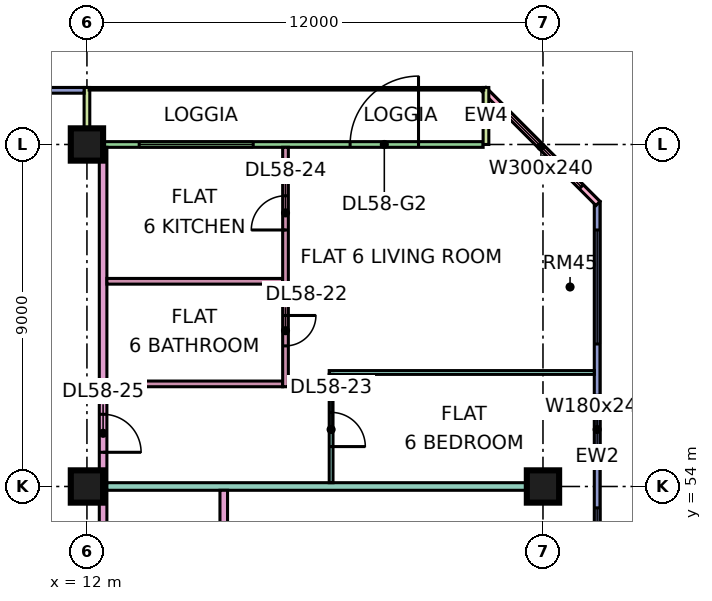
"""IFC4 building model, lengths in metres.
Left out: names, types, materials, properties, quantities, classifications, styles, units other than length and angle.
Written with IfcOpenShell. Run it as: python <this file> out.ifc"""

import sys

from ifc_helpers import new_model, si_unit, direction, frame, frame_2d, origin, origin_2d, place, context, subcontext, project, spatial, rectangle, extrude, element, fill, save


model = new_model("IFC4")
c1 = context("Model", 3, precision=1e-05, world=origin(), true_north=direction((0.0, 1.0)))
c2 = subcontext(c1, "Body", "Model", "MODEL_VIEW")
j1 = project(units=[si_unit("LENGTHUNIT", "METRE"), si_unit("PLANEANGLEUNIT", "RADIAN")], contexts=[c1])
p1 = place(None, origin())
s1 = spatial("IfcSite", under=j1, at=p1, CompositionType="ELEMENT")
p2 = place(p1, origin())
s2 = spatial("IfcBuilding", under=s1, at=p2, CompositionType="ELEMENT")
p3 = place(p2, frame((0.0, 0.0, 245.4)))
s3 = spatial("IfcBuildingStorey", under=s2, at=p3, CompositionType="ELEMENT", Elevation=245.4)
for number, where, z_axis, x_axis in (
    (1, (12.0, 54.0, 0.0), (0.0, 0.0, 1.0), (1.0, 0.0, 0.0)),
    (2, (12.0, 63.0, 0.0), (0.0, 0.0, 1.0), (1.0, 0.0, 0.0)),
    (3, (24.0, 54.0, 0.0), (0.0, 0.0, 1.0), (1.0, 0.0, 0.0)),
):
    element("IfcColumn", number, at=place(p3, frame(where, z_axis=z_axis, x_axis=x_axis)), inside=s3, PredefinedType="COLUMN", context=c2, shape_type="SweptSolid", body=[
        extrude(rectangle(XDim=0.85, YDim=0.85, at=origin_2d()), origin(), (0.0, 0.0, 1.0), 3.75),
    ])
p4 = place(p3, frame((25.425, 48.075, 0.0), z_axis=(0.0, 0.0, 1.0), x_axis=(0.0, 1.0, 0.0)))
e4 = element("IfcWall", 4, at=p4, inside=s3, PredefinedType="SOLIDWALL", context=c2, shape_type="SweptSolid", body=[
    extrude(rectangle(XDim=13.425, YDim=0.15, at=frame_2d((6.712, 0.0))), origin(), (0.0, 0.0, 1.0), 3.35),
])
p5 = place(p4, frame((0.562, 0.0, 0.45)))
e5 = element("IfcOpeningElement", 5, at=p5, cuts=e4, PredefinedType="OPENING", context=c2, shape_type="SweptSolid", body=[
    extrude(rectangle(XDim=4.8, YDim=2.4, at=frame_2d((2.4, 1.2))), frame((0.0, 0.085, 0.0), z_axis=(0.0, -1.0, 0.0), x_axis=(1.0, 0.0, 0.0)), (0.0, 0.0, 1.0), 0.17),
])
p6 = place(p4, frame((6.525, 0.0, 0.45)))
e6 = element("IfcOpeningElement", 6, at=p6, cuts=e4, PredefinedType="OPENING", context=c2, shape_type="SweptSolid", body=[
    extrude(rectangle(XDim=1.8, YDim=2.4, at=frame_2d((0.9, 1.2))), frame((0.0, 0.085, 0.0), z_axis=(0.0, -1.0, 0.0), x_axis=(1.0, 0.0, 0.0)), (0.0, 0.0, 1.0), 0.17),
])
p7 = place(p4, frame((9.675, 0.0, 0.45)))
e7 = element("IfcOpeningElement", 7, at=p7, cuts=e4, PredefinedType="OPENING", context=c2, shape_type="SweptSolid", body=[
    extrude(rectangle(XDim=3.0, YDim=2.4, at=frame_2d((1.5, 1.2))), frame((0.0, 0.085, 0.0), z_axis=(0.0, -1.0, 0.0), x_axis=(1.0, 0.0, 0.0)), (0.0, 0.0, 1.0), 0.17),
])
p8 = place(p3, frame((25.447, 61.447, 0.0), z_axis=(0.0, 0.0, 1.0), x_axis=(-0.707106781187, 0.707106781187, 0.0)))
e8 = element("IfcWall", 8, at=p8, inside=s3, PredefinedType="SOLIDWALL", context=c2, shape_type="SweptSolid", body=[
    extrude(rectangle(XDim=4.243, YDim=0.15, at=frame_2d((2.121, 0.0))), origin(), (0.0, 0.0, 1.0), 3.35),
])
p9 = place(p8, frame((0.621, 0.0, 0.45)))
e9 = element("IfcOpeningElement", 9, at=p9, cuts=e8, PredefinedType="OPENING", context=c2, shape_type="SweptSolid", body=[
    extrude(rectangle(XDim=3.0, YDim=2.4, at=frame_2d((1.5, 1.2))), frame((0.0, 0.085, 0.0), z_axis=(0.0, -1.0, 0.0), x_axis=(1.0, 0.0, 0.0)), (0.0, 0.0, 1.0), 0.17),
])
p10 = place(p3, frame((22.425, 63.0, 0.0), z_axis=(0.0, 0.0, 1.0), x_axis=(-1.0, 0.0, 0.0)))
e10 = element("IfcWall", 10, at=p10, inside=s3, PredefinedType="SOLIDWALL", context=c2, shape_type="SweptSolid", body=[
    extrude(rectangle(XDim=10.35, YDim=0.15, at=frame_2d((5.175, 0.0))), origin(), (0.0, 0.0, 1.0), 3.35),
])
p11 = place(p10, frame((1.7, 0.0, 0.0)))
e11 = element("IfcOpeningElement", 11, at=p11, cuts=e10, PredefinedType="OPENING", context=c2, shape_type="SweptSolid", body=[
    extrude(rectangle(XDim=1.8, YDim=2.4, at=frame_2d((0.9, 1.2))), frame((0.0, 0.085, 0.0), z_axis=(0.0, -1.0, 0.0), x_axis=(1.0, 0.0, 0.0)), (0.0, 0.0, 1.0), 0.17),
])
p12 = place(p10, frame((6.05, 0.0, 0.45)))
e12 = element("IfcOpeningElement", 12, at=p12, cuts=e10, PredefinedType="OPENING", context=c2, shape_type="SweptSolid", body=[
    extrude(rectangle(XDim=3.0, YDim=2.4, at=frame_2d((1.5, 1.2))), frame((0.0, 0.085, 0.0), z_axis=(0.0, -1.0, 0.0), x_axis=(1.0, 0.0, 0.0)), (0.0, 0.0, 1.0), 0.17),
])
for number, where, z_axis, x_axis in (
    (13, (22.5, 64.5, 0.0), (0.0, 0.0, 1.0), (0.0, -1.0, 0.0)),
    (14, (12.0, 64.5, 0.0), (0.0, 0.0, 1.0), (0.0, -1.0, 0.0)),
):
    element("IfcWall", number, at=place(p3, frame(where, z_axis=z_axis, x_axis=x_axis)), inside=s3, PredefinedType="SOLIDWALL", context=c2, shape_type="SweptSolid", body=[
        extrude(rectangle(XDim=1.5, YDim=0.15, at=frame_2d((0.75, 0.0))), origin(), (0.0, 0.0, 1.0), 3.35),
    ])
p13 = place(p3, frame((11.925, 64.425, 0.0), z_axis=(0.0, 0.0, 1.0), x_axis=(-1.0, 0.0, 0.0)))
e15 = element("IfcWall", 15, at=p13, inside=s3, PredefinedType="SOLIDWALL", context=c2, shape_type="SweptSolid", body=[
    extrude(rectangle(XDim=10.425, YDim=0.15, at=frame_2d((5.212, 0.0))), origin(), (0.0, 0.0, 1.0), 3.35),
])
p14 = place(p13, frame((6.675, 0.0, 0.45)))
e16 = element("IfcOpeningElement", 16, at=p14, cuts=e15, PredefinedType="OPENING", context=c2, shape_type="SweptSolid", body=[
    extrude(rectangle(XDim=3.0, YDim=2.4, at=frame_2d((1.5, 1.2))), frame((0.0, 0.085, 0.0), z_axis=(0.0, -1.0, 0.0), x_axis=(1.0, 0.0, 0.0)), (0.0, 0.0, 1.0), 0.17),
])
p15 = place(p3, frame((12.425, 20.0, 0.0), z_axis=(0.0, 0.0, 1.0), x_axis=(0.0, 1.0, 0.0)))
e17 = element("IfcWall", 17, at=p15, inside=s3, PredefinedType="PARTITIONING", context=c2, shape_type="SweptSolid", body=[
    extrude(rectangle(XDim=42.926, YDim=0.2, at=frame_2d((21.463, 0.0))), origin(), (0.0, 0.0, 1.0), 3.35),
])
p16 = place(p15, frame((7.0, 0.0, 0.0)))
e18 = element("IfcOpeningElement", 18, at=p16, cuts=e17, PredefinedType="OPENING", context=c2, shape_type="SweptSolid", body=[
    extrude(rectangle(XDim=1.0, YDim=2.1, at=frame_2d((0.5, 1.05))), frame((0.0, 0.11, 0.0), z_axis=(0.0, -1.0, 0.0), x_axis=(1.0, 0.0, 0.0)), (0.0, 0.0, 1.0), 0.22),
])
p17 = place(p15, frame((12.95, 0.0, 0.0)))
e19 = element("IfcOpeningElement", 19, at=p17, cuts=e17, PredefinedType="OPENING", context=c2, shape_type="SweptSolid", body=[
    extrude(rectangle(XDim=1.0, YDim=2.1, at=frame_2d((0.5, 1.05))), frame((0.0, 0.11, 0.0), z_axis=(0.0, -1.0, 0.0), x_axis=(1.0, 0.0, 0.0)), (0.0, 0.0, 1.0), 0.22),
])
p18 = place(p15, frame((16.75, 0.0, 0.0)))
e20 = element("IfcOpeningElement", 20, at=p18, cuts=e17, PredefinedType="OPENING", context=c2, shape_type="SweptSolid", body=[
    extrude(rectangle(XDim=1.0, YDim=2.1, at=frame_2d((0.5, 1.05))), frame((0.0, 0.11, 0.0), z_axis=(0.0, -1.0, 0.0), x_axis=(1.0, 0.0, 0.0)), (0.0, 0.0, 1.0), 0.22),
])
p19 = place(p15, frame((34.9, 0.0, 0.0)))
e21 = element("IfcOpeningElement", 21, at=p19, cuts=e17, PredefinedType="OPENING", context=c2, shape_type="SweptSolid", body=[
    extrude(rectangle(XDim=1.0, YDim=2.1, at=frame_2d((0.5, 1.05))), frame((0.0, 0.11, 0.0), z_axis=(0.0, -1.0, 0.0), x_axis=(1.0, 0.0, 0.0)), (0.0, 0.0, 1.0), 0.22),
])
p20 = place(p15, frame((1.15, 0.0, 0.0)))
e22 = element("IfcOpeningElement", 22, at=p20, cuts=e17, PredefinedType="OPENING", context=c2, shape_type="SweptSolid", body=[
    extrude(rectangle(XDim=1.8, YDim=2.1, at=frame_2d((0.9, 1.05))), frame((0.0, 0.11, 0.0), z_axis=(0.0, -1.0, 0.0), x_axis=(1.0, 0.0, 0.0)), (0.0, 0.0, 1.0), 0.22),
])
p21 = place(p15, frame((28.6, 0.0, 0.0)))
e23 = element("IfcOpeningElement", 23, at=p21, cuts=e17, PredefinedType="OPENING", context=c2, shape_type="SweptSolid", body=[
    extrude(rectangle(XDim=1.8, YDim=2.1, at=frame_2d((0.9, 1.05))), frame((0.0, 0.11, 0.0), z_axis=(0.0, -1.0, 0.0), x_axis=(1.0, 0.0, 0.0)), (0.0, 0.0, 1.0), 0.22),
])
p22 = place(p3, frame((12.525, 54.0, 0.0), z_axis=(0.0, 0.0, 1.0), x_axis=(1.0, 0.0, 0.0)))
e24 = element("IfcWall", 24, at=p22, inside=s3, PredefinedType="PARTITIONING", context=c2, shape_type="SweptSolid", body=[
    extrude(rectangle(XDim=11.475, YDim=0.2, at=frame_2d((5.738, 0.0))), origin(), (0.0, 0.0, 1.0), 3.35),
])
for number, where, z_axis, x_axis in (
    (25, (12.525, 56.7, 0.0), (0.0, 0.0, 1.0), (1.0, 0.0, 0.0)),
    (26, (12.525, 59.4, 0.0), (0.0, 0.0, 1.0), (1.0, 0.0, 0.0)),
):
    element("IfcWall", number, at=place(p3, frame(where, z_axis=z_axis, x_axis=x_axis)), inside=s3, PredefinedType="PARTITIONING", context=c2, shape_type="SweptSolid", body=[
        extrude(rectangle(XDim=4.625, YDim=0.15, at=frame_2d((2.312, 0.0))), origin(), (0.0, 0.0, 1.0), 3.35),
    ])
p23 = place(p3, frame((15.6, 51.225, 0.0), z_axis=(0.0, 0.0, 1.0), x_axis=(0.0, 1.0, 0.0)))
e27 = element("IfcWall", 27, at=p23, inside=s3, PredefinedType="PARTITIONING", context=c2, shape_type="SweptSolid", body=[
    extrude(rectangle(XDim=2.675, YDim=0.2, at=frame_2d((1.337, 0.0))), origin(), (0.0, 0.0, 1.0), 3.35),
])
p24 = place(p3, frame((17.225, 56.625, 0.0), z_axis=(0.0, 0.0, 1.0), x_axis=(0.0, 1.0, 0.0)))
e28 = element("IfcWall", 28, at=p24, inside=s3, PredefinedType="PARTITIONING", context=c2, shape_type="SweptSolid", body=[
    extrude(rectangle(XDim=6.301, YDim=0.15, at=frame_2d((3.15, 0.0))), origin(), (0.0, 0.0, 1.0), 3.35),
])
p25 = place(p24, frame((1.075, 0.0, 0.0)))
e29 = element("IfcOpeningElement", 29, at=p25, cuts=e28, PredefinedType="OPENING", context=c2, shape_type="SweptSolid", body=[
    extrude(rectangle(XDim=0.8, YDim=2.1, at=frame_2d((0.4, 1.05))), frame((0.0, 0.085, 0.0), z_axis=(0.0, -1.0, 0.0), x_axis=(1.0, 0.0, 0.0)), (0.0, 0.0, 1.0), 0.17),
])
p26 = place(p24, frame((4.125, 0.0, 0.0)))
e30 = element("IfcOpeningElement", 30, at=p26, cuts=e28, PredefinedType="OPENING", context=c2, shape_type="SweptSolid", body=[
    extrude(rectangle(XDim=0.9, YDim=2.1, at=frame_2d((0.45, 1.05))), frame((0.0, 0.085, 0.0), z_axis=(0.0, -1.0, 0.0), x_axis=(1.0, 0.0, 0.0)), (0.0, 0.0, 1.0), 0.17),
])
p27 = place(p3, frame((18.375, 57.0, 0.0), z_axis=(0.0, 0.0, 1.0), x_axis=(1.0, 0.0, 0.0)))
e31 = element("IfcWall", 31, at=p27, inside=s3, PredefinedType="PARTITIONING", context=c2, shape_type="SweptSolid", body=[
    extrude(rectangle(XDim=6.975, YDim=0.1, at=frame_2d((3.488, 0.0))), origin(), (0.0, 0.0, 1.0), 3.35),
])
p28 = place(p3, frame((18.425, 54.1, 0.0), z_axis=(0.0, 0.0, 1.0), x_axis=(0.0, 1.0, 0.0)))
e32 = element("IfcWall", 32, at=p28, inside=s3, PredefinedType="PARTITIONING", context=c2, shape_type="SweptSolid", body=[
    extrude(rectangle(XDim=2.85, YDim=0.1, at=frame_2d((1.425, 0.0))), origin(), (0.0, 0.0, 1.0), 3.35),
])
p29 = place(p28, frame((0.95, 0.0, 0.0)))
e33 = element("IfcOpeningElement", 33, at=p29, cuts=e32, PredefinedType="OPENING", context=c2, shape_type="SweptSolid", body=[
    extrude(rectangle(XDim=0.9, YDim=2.1, at=frame_2d((0.45, 1.05))), frame((0.0, 0.06, 0.0), z_axis=(0.0, -1.0, 0.0), x_axis=(1.0, 0.0, 0.0)), (0.0, 0.0, 1.0), 0.12),
])
p30 = place(p5, origin())
e34 = element("IfcWindow", 34, at=p30, inside=s3, PartitioningType="SINGLE_PANEL", PredefinedType="WINDOW", context=c2, shape_type="SweptSolid", body=[
    extrude(rectangle(XDim=4.8, YDim=2.4, at=frame_2d((2.4, 1.2))), frame((0.0, 0.03, 0.0), z_axis=(0.0, -1.0, 0.0), x_axis=(1.0, 0.0, 0.0)), (0.0, 0.0, 1.0), 0.06),
])
fill(e5, e34)
p31 = place(p6, origin())
e35 = element("IfcWindow", 35, at=p31, inside=s3, PartitioningType="SINGLE_PANEL", PredefinedType="WINDOW", context=c2, shape_type="SweptSolid", body=[
    extrude(rectangle(XDim=1.8, YDim=2.4, at=frame_2d((0.9, 1.2))), frame((0.0, 0.03, 0.0), z_axis=(0.0, -1.0, 0.0), x_axis=(1.0, 0.0, 0.0)), (0.0, 0.0, 1.0), 0.06),
])
fill(e6, e35)
p32 = place(p7, origin())
e36 = element("IfcWindow", 36, at=p32, inside=s3, PartitioningType="SINGLE_PANEL", PredefinedType="WINDOW", context=c2, shape_type="SweptSolid", body=[
    extrude(rectangle(XDim=3.0, YDim=2.4, at=frame_2d((1.5, 1.2))), frame((0.0, 0.03, 0.0), z_axis=(0.0, -1.0, 0.0), x_axis=(1.0, 0.0, 0.0)), (0.0, 0.0, 1.0), 0.06),
])
fill(e7, e36)
p33 = place(p9, origin())
e37 = element("IfcWindow", 37, at=p33, inside=s3, PartitioningType="SINGLE_PANEL", PredefinedType="WINDOW", context=c2, shape_type="SweptSolid", body=[
    extrude(rectangle(XDim=3.0, YDim=2.4, at=frame_2d((1.5, 1.2))), frame((0.0, 0.03, 0.0), z_axis=(0.0, -1.0, 0.0), x_axis=(1.0, 0.0, 0.0)), (0.0, 0.0, 1.0), 0.06),
])
fill(e9, e37)
p34 = place(p11, frame((1.8, 0.0, 0.0), z_axis=(0.0, 0.0, 1.0), x_axis=(-1.0, 0.0, 0.0)))
e38 = element("IfcDoor", 38, at=p34, inside=s3, OperationType="DOUBLE_DOOR_SINGLE_SWING", PredefinedType="DOOR", context=c2, shape_type="SweptSolid", body=[
    extrude(rectangle(XDim=1.8, YDim=2.4, at=frame_2d((0.9, 1.2))), frame((0.0, 0.025, 0.0), z_axis=(0.0, -1.0, 0.0), x_axis=(1.0, 0.0, 0.0)), (0.0, 0.0, 1.0), 0.05),
])
fill(e11, e38)
p35 = place(p12, origin())
e39 = element("IfcWindow", 39, at=p35, inside=s3, PartitioningType="SINGLE_PANEL", PredefinedType="WINDOW", context=c2, shape_type="SweptSolid", body=[
    extrude(rectangle(XDim=3.0, YDim=2.4, at=frame_2d((1.5, 1.2))), frame((0.0, 0.03, 0.0), z_axis=(0.0, -1.0, 0.0), x_axis=(1.0, 0.0, 0.0)), (0.0, 0.0, 1.0), 0.06),
])
fill(e12, e39)
p36 = place(p25, origin())
e40 = element("IfcDoor", 40, at=p36, inside=s3, OperationType="SINGLE_SWING_RIGHT", PredefinedType="DOOR", context=c2, shape_type="SweptSolid", body=[
    extrude(rectangle(XDim=0.8, YDim=2.1, at=frame_2d((0.4, 1.05))), frame((0.0, 0.025, 0.0), z_axis=(0.0, -1.0, 0.0), x_axis=(1.0, 0.0, 0.0)), (0.0, 0.0, 1.0), 0.05),
])
fill(e29, e40)
p37 = place(p29, frame((0.9, 0.0, 0.0), z_axis=(0.0, 0.0, 1.0), x_axis=(-1.0, 0.0, 0.0)))
e41 = element("IfcDoor", 41, at=p37, inside=s3, OperationType="SINGLE_SWING_LEFT", PredefinedType="DOOR", context=c2, shape_type="SweptSolid", body=[
    extrude(rectangle(XDim=0.9, YDim=2.1, at=frame_2d((0.45, 1.05))), frame((0.0, 0.025, 0.0), z_axis=(0.0, -1.0, 0.0), x_axis=(1.0, 0.0, 0.0)), (0.0, 0.0, 1.0), 0.05),
])
fill(e33, e41)
p38 = place(p26, origin())
e42 = element("IfcDoor", 42, at=p38, inside=s3, OperationType="SINGLE_SWING_LEFT", PredefinedType="DOOR", context=c2, shape_type="SweptSolid", body=[
    extrude(rectangle(XDim=0.9, YDim=2.1, at=frame_2d((0.45, 1.05))), frame((0.0, 0.025, 0.0), z_axis=(0.0, -1.0, 0.0), x_axis=(1.0, 0.0, 0.0)), (0.0, 0.0, 1.0), 0.05),
])
fill(e30, e42)
p39 = place(p19, frame((1.0, 0.0, 0.0), z_axis=(0.0, 0.0, 1.0), x_axis=(-1.0, 0.0, 0.0)))
e43 = element("IfcDoor", 43, at=p39, inside=s3, OperationType="SINGLE_SWING_LEFT", PredefinedType="DOOR", context=c2, shape_type="SweptSolid", body=[
    extrude(rectangle(XDim=1.0, YDim=2.1, at=frame_2d((0.5, 1.05))), frame((0.0, 0.025, 0.0), z_axis=(0.0, -1.0, 0.0), x_axis=(1.0, 0.0, 0.0)), (0.0, 0.0, 1.0), 0.05),
])
fill(e21, e43)
save(model, sys.argv[1])
